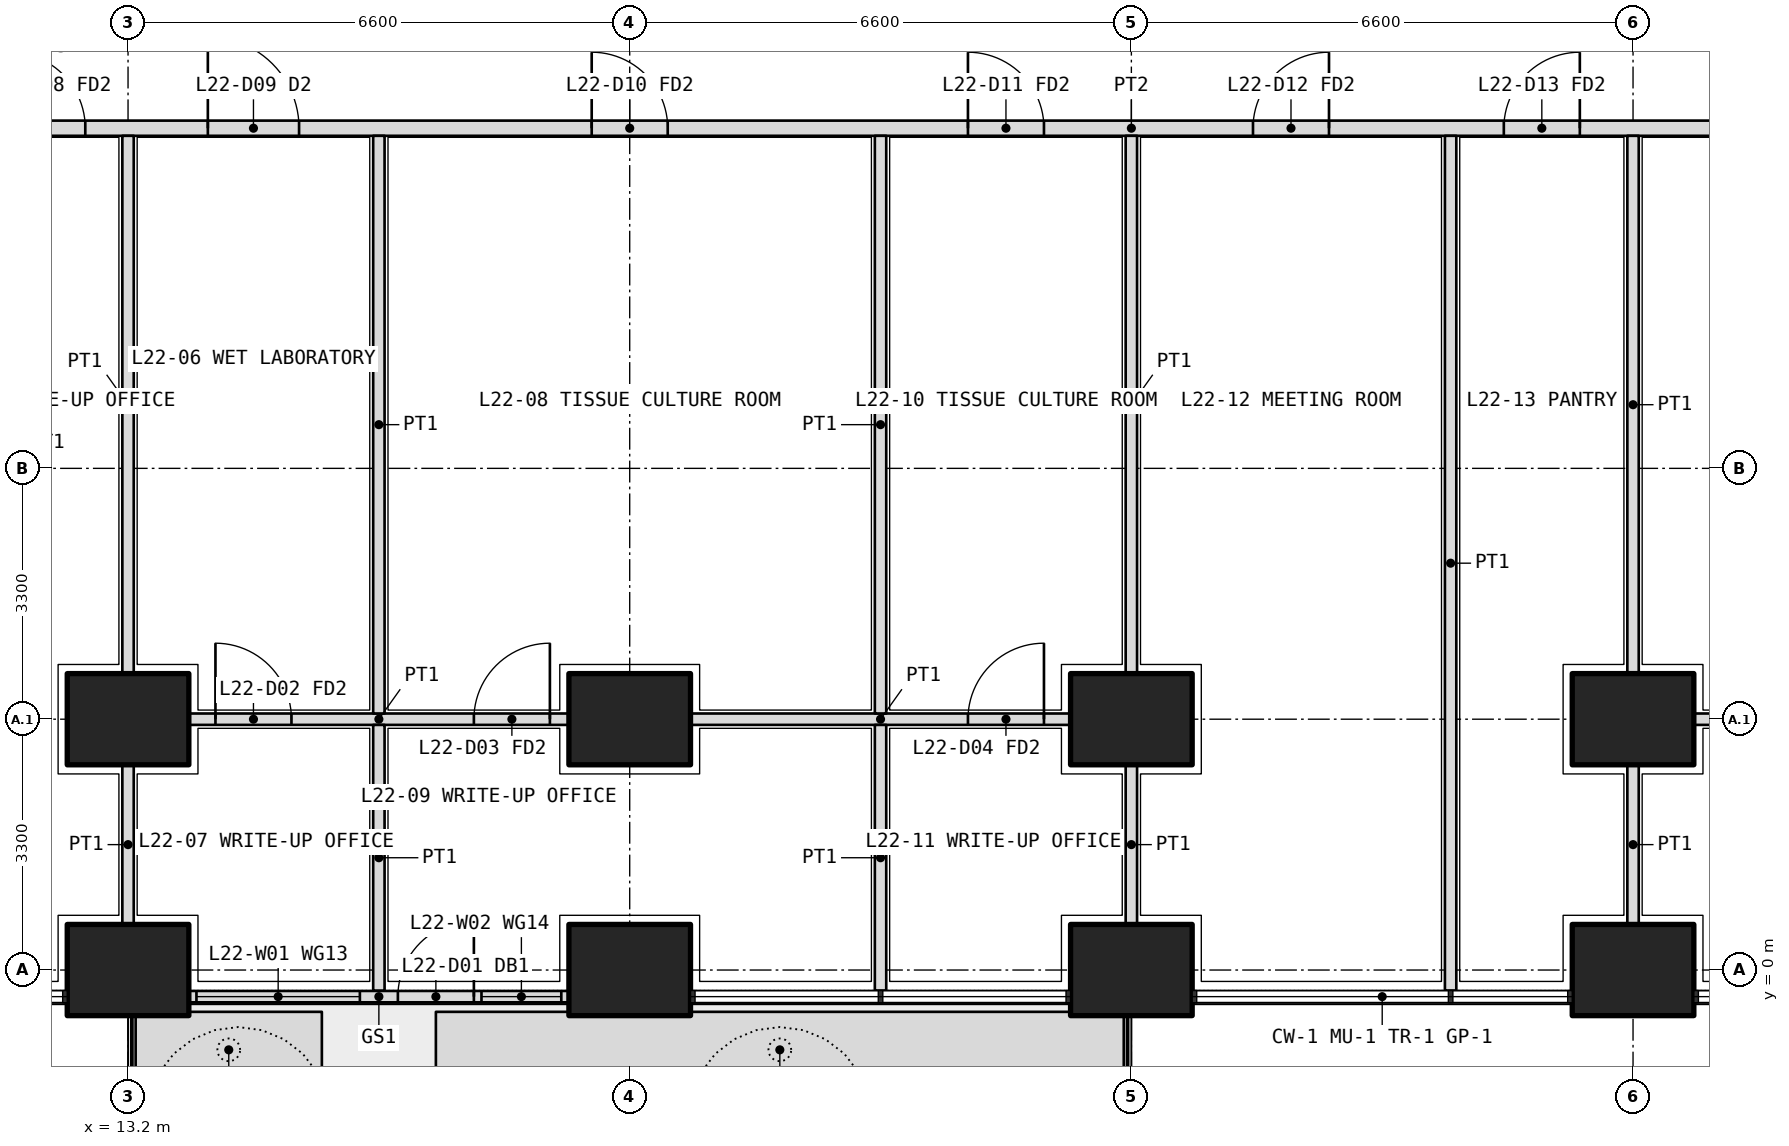
"""IFC4 building model, lengths in metres.
Left out: names, types, materials, properties, quantities, classifications, styles, units other than length and angle.
Written with IfcOpenShell. Run it as: python <this file> out.ifc"""

import sys

from ifc_helpers import new_model, si_unit, direction, frame, frame_2d, origin, origin_2d, place, context, subcontext, project, spatial, polyline, rectangle, outline, extrude, element, fill, save


model = new_model("IFC4")
c1 = context("Model", 3, precision=1e-05, world=origin(), true_north=direction((0.0, 1.0)))
c2 = subcontext(c1, "Body", "Model", "MODEL_VIEW")
j1 = project(units=[si_unit("LENGTHUNIT", "METRE"), si_unit("PLANEANGLEUNIT", "RADIAN")], contexts=[c1])
p1 = place(None, origin())
s1 = spatial("IfcSite", under=j1, at=p1, CompositionType="ELEMENT")
p2 = place(p1, origin())
s2 = spatial("IfcBuilding", under=s1, at=p2, CompositionType="ELEMENT")
p3 = place(p2, frame((0.0, 0.0, 99.0)))
s3 = spatial("IfcBuildingStorey", under=s2, at=p3, CompositionType="ELEMENT", Elevation=99.0)
for number, where, z_axis, x_axis in (
    (1, (13.2, 0.0, 0.0), (0.0, 0.0, 1.0), (1.0, 0.0, 0.0)),
    (2, (19.8, 0.0, 0.0), (0.0, 0.0, 1.0), (1.0, 0.0, 0.0)),
    (3, (26.4, 0.0, 0.0), (0.0, 0.0, 1.0), (1.0, 0.0, 0.0)),
    (4, (33.0, 0.0, 0.0), (0.0, 0.0, 1.0), (1.0, 0.0, 0.0)),
    (5, (13.2, 3.3, 0.0), (0.0, 0.0, 1.0), (1.0, 0.0, 0.0)),
    (6, (19.8, 3.3, 0.0), (0.0, 0.0, 1.0), (1.0, 0.0, 0.0)),
    (7, (26.4, 3.3, 0.0), (0.0, 0.0, 1.0), (1.0, 0.0, 0.0)),
    (8, (33.0, 3.3, 0.0), (0.0, 0.0, 1.0), (1.0, 0.0, 0.0)),
):
    element("IfcColumn", number, at=place(p3, frame(where, z_axis=z_axis, x_axis=x_axis)), inside=s3, PredefinedType="COLUMN", context=c2, shape_type="SweptSolid", body=[
        extrude(rectangle(XDim=1.6, YDim=1.2, at=origin_2d()), origin(), (0.0, 0.0, 1.0), 4.2),
    ])
p4 = place(p3, origin())
e9 = element("IfcWall", 9, at=p4, inside=s3, PredefinedType="USERDEFINED", context=c2, shape_type="SweptSolid", body=[
    extrude(outline(polyline([(13.3, -1.55), (15.75, -1.55), (15.75, -0.55), (13.3, -0.55), (13.3, -1.55)]), holes=[polyline([(13.45, -1.4), (15.6, -1.4), (15.6, -0.7), (13.45, -0.7), (13.45, -1.4)])]), origin(), (0.0, 0.0, 1.0), 1.05),
])
p5 = place(p3, origin())
e10 = element("IfcWall", 10, at=p5, inside=s3, PredefinedType="USERDEFINED", context=c2, shape_type="SweptSolid", body=[
    extrude(outline(polyline([(17.25, -1.55), (26.3, -1.55), (26.3, -0.55), (17.25, -0.55), (17.25, -1.55)]), holes=[polyline([(17.4, -1.4), (26.15, -1.4), (26.15, -0.7), (17.4, -0.7), (17.4, -1.4)])]), origin(), (0.0, 0.0, 1.0), 1.05),
])
p6 = place(p3, frame((14.0, -0.35, 0.0), z_axis=(0.0, 0.0, 1.0), x_axis=(1.0, 0.0, 0.0)))
e11 = element("IfcWall", 11, at=p6, inside=s3, PredefinedType="SOLIDWALL", context=c2, shape_type="SweptSolid", body=[
    extrude(rectangle(XDim=5.0, YDim=0.15, at=frame_2d((2.5, 0.0))), origin(), (0.0, 0.0, 1.0), 2.7),
])
p7 = place(p6, frame((2.75, 0.0, 0.0)))
e12 = element("IfcOpeningElement", 12, at=p7, cuts=e11, PredefinedType="OPENING", context=c2, shape_type="SweptSolid", body=[
    extrude(rectangle(XDim=1.0, YDim=2.4, at=frame_2d((0.5, 1.2))), frame((0.0, 0.085, 0.0), z_axis=(0.0, -1.0, 0.0), x_axis=(1.0, 0.0, 0.0)), (0.0, 0.0, 1.0), 0.17),
])
p8 = place(p6, frame((0.1, 0.0, 0.1)))
e13 = element("IfcOpeningElement", 13, at=p8, cuts=e11, PredefinedType="OPENING", context=c2, shape_type="SweptSolid", body=[
    extrude(rectangle(XDim=2.15, YDim=2.3, at=frame_2d((1.075, 1.15))), frame((0.0, 0.085, 0.0), z_axis=(0.0, -1.0, 0.0), x_axis=(1.0, 0.0, 0.0)), (0.0, 0.0, 1.0), 0.17),
])
p9 = place(p6, frame((3.85, 0.0, 0.1)))
e14 = element("IfcOpeningElement", 14, at=p9, cuts=e11, PredefinedType="OPENING", context=c2, shape_type="SweptSolid", body=[
    extrude(rectangle(XDim=1.05, YDim=2.3, at=frame_2d((0.525, 1.15))), frame((0.0, 0.085, 0.0), z_axis=(0.0, -1.0, 0.0), x_axis=(1.0, 0.0, 0.0)), (0.0, 0.0, 1.0), 0.17),
])
p10 = place(p3, frame((10.975, 11.075, 0.0), z_axis=(0.0, 0.0, 1.0), x_axis=(1.0, 0.0, 0.0)))
e15 = element("IfcWall", 15, at=p10, inside=s3, PredefinedType="PARTITIONING", context=c2, shape_type="SweptSolid", body=[
    extrude(rectangle(XDim=30.85, YDim=0.2, at=frame_2d((15.425, 0.0))), origin(), (0.0, 0.0, 1.0), 2.85),
])
p11 = place(p10, frame((0.663, 0.0, 0.0)))
e16 = element("IfcOpeningElement", 16, at=p11, cuts=e15, PredefinedType="OPENING", context=c2, shape_type="SweptSolid", body=[
    extrude(rectangle(XDim=1.0, YDim=2.1, at=frame_2d((0.5, 1.05))), frame((0.0, 0.11, 0.0), z_axis=(0.0, -1.0, 0.0), x_axis=(1.0, 0.0, 0.0)), (0.0, 0.0, 1.0), 0.22),
])
p12 = place(p10, frame((3.275, 0.0, 0.0)))
e17 = element("IfcOpeningElement", 17, at=p12, cuts=e15, PredefinedType="OPENING", context=c2, shape_type="SweptSolid", body=[
    extrude(rectangle(XDim=1.2, YDim=2.1, at=frame_2d((0.6, 1.05))), frame((0.0, 0.11, 0.0), z_axis=(0.0, -1.0, 0.0), x_axis=(1.0, 0.0, 0.0)), (0.0, 0.0, 1.0), 0.22),
])
p13 = place(p10, frame((8.325, 0.0, 0.0)))
e18 = element("IfcOpeningElement", 18, at=p13, cuts=e15, PredefinedType="OPENING", context=c2, shape_type="SweptSolid", body=[
    extrude(rectangle(XDim=1.0, YDim=2.1, at=frame_2d((0.5, 1.05))), frame((0.0, 0.11, 0.0), z_axis=(0.0, -1.0, 0.0), x_axis=(1.0, 0.0, 0.0)), (0.0, 0.0, 1.0), 0.22),
])
p14 = place(p10, frame((13.275, 0.0, 0.0)))
e19 = element("IfcOpeningElement", 19, at=p14, cuts=e15, PredefinedType="OPENING", context=c2, shape_type="SweptSolid", body=[
    extrude(rectangle(XDim=1.0, YDim=2.1, at=frame_2d((0.5, 1.05))), frame((0.0, 0.11, 0.0), z_axis=(0.0, -1.0, 0.0), x_axis=(1.0, 0.0, 0.0)), (0.0, 0.0, 1.0), 0.22),
])
p15 = place(p10, frame((17.025, 0.0, 0.0)))
e20 = element("IfcOpeningElement", 20, at=p15, cuts=e15, PredefinedType="OPENING", context=c2, shape_type="SweptSolid", body=[
    extrude(rectangle(XDim=1.0, YDim=2.1, at=frame_2d((0.5, 1.05))), frame((0.0, 0.11, 0.0), z_axis=(0.0, -1.0, 0.0), x_axis=(1.0, 0.0, 0.0)), (0.0, 0.0, 1.0), 0.22),
])
p16 = place(p10, frame((20.325, 0.0, 0.0)))
e21 = element("IfcOpeningElement", 21, at=p16, cuts=e15, PredefinedType="OPENING", context=c2, shape_type="SweptSolid", body=[
    extrude(rectangle(XDim=1.0, YDim=2.1, at=frame_2d((0.5, 1.05))), frame((0.0, 0.11, 0.0), z_axis=(0.0, -1.0, 0.0), x_axis=(1.0, 0.0, 0.0)), (0.0, 0.0, 1.0), 0.22),
])
p17 = place(p10, frame((25.887, 0.0, 0.0)))
e22 = element("IfcOpeningElement", 22, at=p17, cuts=e15, PredefinedType="OPENING", context=c2, shape_type="SweptSolid", body=[
    extrude(rectangle(XDim=1.0, YDim=2.1, at=frame_2d((0.5, 1.05))), frame((0.0, 0.11, 0.0), z_axis=(0.0, -1.0, 0.0), x_axis=(1.0, 0.0, 0.0)), (0.0, 0.0, 1.0), 0.22),
])
p18 = place(p3, frame((14.0, 3.3, 0.0), z_axis=(0.0, 0.0, 1.0), x_axis=(1.0, 0.0, 0.0)))
e23 = element("IfcWall", 23, at=p18, inside=s3, PredefinedType="PARTITIONING", context=c2, shape_type="SweptSolid", body=[
    extrude(rectangle(XDim=5.0, YDim=0.15, at=frame_2d((2.5, 0.0))), origin(), (0.0, 0.0, 1.0), 3.9),
])
p19 = place(p18, frame((0.35, 0.0, 0.0)))
e24 = element("IfcOpeningElement", 24, at=p19, cuts=e23, PredefinedType="OPENING", context=c2, shape_type="SweptSolid", body=[
    extrude(rectangle(XDim=1.0, YDim=2.1, at=frame_2d((0.5, 1.05))), frame((0.0, 0.085, 0.0), z_axis=(0.0, -1.0, 0.0), x_axis=(1.0, 0.0, 0.0)), (0.0, 0.0, 1.0), 0.17),
])
p20 = place(p18, frame((3.75, 0.0, 0.0)))
e25 = element("IfcOpeningElement", 25, at=p20, cuts=e23, PredefinedType="OPENING", context=c2, shape_type="SweptSolid", body=[
    extrude(rectangle(XDim=1.0, YDim=2.1, at=frame_2d((0.5, 1.05))), frame((0.0, 0.085, 0.0), z_axis=(0.0, -1.0, 0.0), x_axis=(1.0, 0.0, 0.0)), (0.0, 0.0, 1.0), 0.17),
])
p21 = place(p3, frame((20.6, 3.3, 0.0), z_axis=(0.0, 0.0, 1.0), x_axis=(1.0, 0.0, 0.0)))
e26 = element("IfcWall", 26, at=p21, inside=s3, PredefinedType="PARTITIONING", context=c2, shape_type="SweptSolid", body=[
    extrude(rectangle(XDim=5.0, YDim=0.15, at=frame_2d((2.5, 0.0))), origin(), (0.0, 0.0, 1.0), 3.9),
])
p22 = place(p21, frame((3.65, 0.0, 0.0)))
e27 = element("IfcOpeningElement", 27, at=p22, cuts=e26, PredefinedType="OPENING", context=c2, shape_type="SweptSolid", body=[
    extrude(rectangle(XDim=1.0, YDim=2.1, at=frame_2d((0.5, 1.05))), frame((0.0, 0.085, 0.0), z_axis=(0.0, -1.0, 0.0), x_axis=(1.0, 0.0, 0.0)), (0.0, 0.0, 1.0), 0.17),
])
p23 = place(p3, frame((33.8, 3.3, 0.0), z_axis=(0.0, 0.0, 1.0), x_axis=(1.0, 0.0, 0.0)))
e28 = element("IfcWall", 28, at=p23, inside=s3, PredefinedType="PARTITIONING", context=c2, shape_type="SweptSolid", body=[
    extrude(rectangle(XDim=5.0, YDim=0.15, at=frame_2d((2.5, 0.0))), origin(), (0.0, 0.0, 1.0), 3.9),
])
p24 = place(p3, frame((30.6, -0.27, 0.0), z_axis=(0.0, 0.0, 1.0), x_axis=(0.0, 1.0, 0.0)))
e29 = element("IfcWall", 29, at=p24, inside=s3, PredefinedType="PARTITIONING", context=c2, shape_type="SweptSolid", body=[
    extrude(rectangle(XDim=11.245, YDim=0.15, at=frame_2d((5.623, 0.0))), origin(), (0.0, 0.0, 1.0), 2.7),
])
p25 = place(p3, frame((33.0, 0.6, 0.0), z_axis=(0.0, 0.0, 1.0), x_axis=(0.0, 1.0, 0.0)))
e30 = element("IfcWall", 30, at=p25, inside=s3, PredefinedType="PARTITIONING", context=c2, shape_type="SweptSolid", body=[
    extrude(rectangle(XDim=2.1, YDim=0.15, at=frame_2d((1.05, 0.0))), origin(), (0.0, 0.0, 1.0), 2.85),
])
p26 = place(p3, frame((33.0, 3.9, 0.0), z_axis=(0.0, 0.0, 1.0), x_axis=(0.0, 1.0, 0.0)))
e31 = element("IfcWall", 31, at=p26, inside=s3, PredefinedType="PARTITIONING", context=c2, shape_type="SweptSolid", body=[
    extrude(rectangle(XDim=7.075, YDim=0.15, at=frame_2d((3.538, 0.0))), origin(), (0.0, 0.0, 1.0), 2.85),
])
p27 = place(p3, frame((13.2, 0.6, 0.0), z_axis=(0.0, 0.0, 1.0), x_axis=(0.0, 1.0, 0.0)))
e32 = element("IfcWall", 32, at=p27, inside=s3, PredefinedType="PARTITIONING", context=c2, shape_type="SweptSolid", body=[
    extrude(rectangle(XDim=2.1, YDim=0.15, at=frame_2d((1.05, 0.0))), origin(), (0.0, 0.0, 1.0), 2.85),
])
p28 = place(p3, frame((13.2, 3.9, 0.0), z_axis=(0.0, 0.0, 1.0), x_axis=(0.0, 1.0, 0.0)))
e33 = element("IfcWall", 33, at=p28, inside=s3, PredefinedType="PARTITIONING", context=c2, shape_type="SweptSolid", body=[
    extrude(rectangle(XDim=7.075, YDim=0.15, at=frame_2d((3.538, 0.0))), origin(), (0.0, 0.0, 1.0), 2.85),
])
p29 = place(p3, frame((16.5, -0.27, 0.0), z_axis=(0.0, 0.0, 1.0), x_axis=(0.0, 1.0, 0.0)))
e34 = element("IfcWall", 34, at=p29, inside=s3, PredefinedType="PARTITIONING", context=c2, shape_type="SweptSolid", body=[
    extrude(rectangle(XDim=3.495, YDim=0.15, at=frame_2d((1.748, 0.0))), origin(), (0.0, 0.0, 1.0), 2.7),
])
p30 = place(p3, frame((16.5, 3.375, 0.0), z_axis=(0.0, 0.0, 1.0), x_axis=(0.0, 1.0, 0.0)))
e35 = element("IfcWall", 35, at=p30, inside=s3, PredefinedType="PARTITIONING", context=c2, shape_type="SweptSolid", body=[
    extrude(rectangle(XDim=7.6, YDim=0.15, at=frame_2d((3.8, 0.0))), origin(), (0.0, 0.0, 1.0), 3.9),
])
p31 = place(p3, frame((23.1, -0.27, 0.0), z_axis=(0.0, 0.0, 1.0), x_axis=(0.0, 1.0, 0.0)))
e36 = element("IfcWall", 36, at=p31, inside=s3, PredefinedType="PARTITIONING", context=c2, shape_type="SweptSolid", body=[
    extrude(rectangle(XDim=3.495, YDim=0.15, at=frame_2d((1.748, 0.0))), origin(), (0.0, 0.0, 1.0), 2.7),
])
p32 = place(p3, frame((23.1, 3.375, 0.0), z_axis=(0.0, 0.0, 1.0), x_axis=(0.0, 1.0, 0.0)))
e37 = element("IfcWall", 37, at=p32, inside=s3, PredefinedType="PARTITIONING", context=c2, shape_type="SweptSolid", body=[
    extrude(rectangle(XDim=7.6, YDim=0.15, at=frame_2d((3.8, 0.0))), origin(), (0.0, 0.0, 1.0), 3.9),
])
p33 = place(p3, frame((26.4, 0.6, 0.0), z_axis=(0.0, 0.0, 1.0), x_axis=(0.0, 1.0, 0.0)))
e38 = element("IfcWall", 38, at=p33, inside=s3, PredefinedType="PARTITIONING", context=c2, shape_type="SweptSolid", body=[
    extrude(rectangle(XDim=2.1, YDim=0.15, at=frame_2d((1.05, 0.0))), origin(), (0.0, 0.0, 1.0), 2.85),
])
p34 = place(p3, frame((26.4, 3.9, 0.0), z_axis=(0.0, 0.0, 1.0), x_axis=(0.0, 1.0, 0.0)))
e39 = element("IfcWall", 39, at=p34, inside=s3, PredefinedType="PARTITIONING", context=c2, shape_type="SweptSolid", body=[
    extrude(rectangle(XDim=7.075, YDim=0.15, at=frame_2d((3.538, 0.0))), origin(), (0.0, 0.0, 1.0), 2.85),
])
p35 = place(p7, origin())
e40 = element("IfcDoor", 40, at=p35, inside=s3, OperationType="SINGLE_SWING_RIGHT", PredefinedType="DOOR", context=c2, shape_type="SweptSolid", body=[
    extrude(rectangle(XDim=1.0, YDim=2.4, at=frame_2d((0.5, 1.2))), frame((0.0, 0.025, 0.0), z_axis=(0.0, -1.0, 0.0), x_axis=(1.0, 0.0, 0.0)), (0.0, 0.0, 1.0), 0.05),
])
fill(e12, e40)
p36 = place(p8, origin())
e41 = element("IfcWindow", 41, at=p36, inside=s3, PartitioningType="SINGLE_PANEL", PredefinedType="WINDOW", context=c2, shape_type="SweptSolid", body=[
    extrude(rectangle(XDim=2.15, YDim=2.3, at=frame_2d((1.075, 1.15))), frame((0.0, 0.03, 0.0), z_axis=(0.0, -1.0, 0.0), x_axis=(1.0, 0.0, 0.0)), (0.0, 0.0, 1.0), 0.06),
])
fill(e13, e41)
p37 = place(p9, origin())
e42 = element("IfcWindow", 42, at=p37, inside=s3, PartitioningType="SINGLE_PANEL", PredefinedType="WINDOW", context=c2, shape_type="SweptSolid", body=[
    extrude(rectangle(XDim=1.05, YDim=2.3, at=frame_2d((0.525, 1.15))), frame((0.0, 0.03, 0.0), z_axis=(0.0, -1.0, 0.0), x_axis=(1.0, 0.0, 0.0)), (0.0, 0.0, 1.0), 0.06),
])
fill(e14, e42)
p38 = place(p11, origin())
e43 = element("IfcDoor", 43, at=p38, inside=s3, OperationType="SINGLE_SWING_LEFT", PredefinedType="DOOR", context=c2, shape_type="SweptSolid", body=[
    extrude(rectangle(XDim=1.0, YDim=2.1, at=frame_2d((0.5, 1.05))), frame((0.0, 0.025, 0.0), z_axis=(0.0, -1.0, 0.0), x_axis=(1.0, 0.0, 0.0)), (0.0, 0.0, 1.0), 0.05),
])
fill(e16, e43)
p39 = place(p12, origin())
e44 = element("IfcDoor", 44, at=p39, inside=s3, OperationType="DOUBLE_DOOR_SINGLE_SWING", PredefinedType="DOOR", context=c2, shape_type="SweptSolid", body=[
    extrude(rectangle(XDim=1.2, YDim=2.1, at=frame_2d((0.6, 1.05))), frame((0.0, 0.025, 0.0), z_axis=(0.0, -1.0, 0.0), x_axis=(1.0, 0.0, 0.0)), (0.0, 0.0, 1.0), 0.05),
])
fill(e17, e44)
p40 = place(p19, origin())
e45 = element("IfcDoor", 45, at=p40, inside=s3, OperationType="SINGLE_SWING_LEFT", PredefinedType="DOOR", context=c2, shape_type="SweptSolid", body=[
    extrude(rectangle(XDim=1.0, YDim=2.1, at=frame_2d((0.5, 1.05))), frame((0.0, 0.025, 0.0), z_axis=(0.0, -1.0, 0.0), x_axis=(1.0, 0.0, 0.0)), (0.0, 0.0, 1.0), 0.05),
])
fill(e24, e45)
p41 = place(p13, origin())
e46 = element("IfcDoor", 46, at=p41, inside=s3, OperationType="SINGLE_SWING_LEFT", PredefinedType="DOOR", context=c2, shape_type="SweptSolid", body=[
    extrude(rectangle(XDim=1.0, YDim=2.1, at=frame_2d((0.5, 1.05))), frame((0.0, 0.025, 0.0), z_axis=(0.0, -1.0, 0.0), x_axis=(1.0, 0.0, 0.0)), (0.0, 0.0, 1.0), 0.05),
])
fill(e18, e46)
p42 = place(p20, origin())
e47 = element("IfcDoor", 47, at=p42, inside=s3, OperationType="SINGLE_SWING_RIGHT", PredefinedType="DOOR", context=c2, shape_type="SweptSolid", body=[
    extrude(rectangle(XDim=1.0, YDim=2.1, at=frame_2d((0.5, 1.05))), frame((0.0, 0.025, 0.0), z_axis=(0.0, -1.0, 0.0), x_axis=(1.0, 0.0, 0.0)), (0.0, 0.0, 1.0), 0.05),
])
fill(e25, e47)
p43 = place(p14, origin())
e48 = element("IfcDoor", 48, at=p43, inside=s3, OperationType="SINGLE_SWING_LEFT", PredefinedType="DOOR", context=c2, shape_type="SweptSolid", body=[
    extrude(rectangle(XDim=1.0, YDim=2.1, at=frame_2d((0.5, 1.05))), frame((0.0, 0.025, 0.0), z_axis=(0.0, -1.0, 0.0), x_axis=(1.0, 0.0, 0.0)), (0.0, 0.0, 1.0), 0.05),
])
fill(e19, e48)
p44 = place(p22, origin())
e49 = element("IfcDoor", 49, at=p44, inside=s3, OperationType="SINGLE_SWING_RIGHT", PredefinedType="DOOR", context=c2, shape_type="SweptSolid", body=[
    extrude(rectangle(XDim=1.0, YDim=2.1, at=frame_2d((0.5, 1.05))), frame((0.0, 0.025, 0.0), z_axis=(0.0, -1.0, 0.0), x_axis=(1.0, 0.0, 0.0)), (0.0, 0.0, 1.0), 0.05),
])
fill(e27, e49)
p45 = place(p15, origin())
e50 = element("IfcDoor", 50, at=p45, inside=s3, OperationType="SINGLE_SWING_RIGHT", PredefinedType="DOOR", context=c2, shape_type="SweptSolid", body=[
    extrude(rectangle(XDim=1.0, YDim=2.1, at=frame_2d((0.5, 1.05))), frame((0.0, 0.025, 0.0), z_axis=(0.0, -1.0, 0.0), x_axis=(1.0, 0.0, 0.0)), (0.0, 0.0, 1.0), 0.05),
])
fill(e20, e50)
p46 = place(p16, origin())
e51 = element("IfcDoor", 51, at=p46, inside=s3, OperationType="SINGLE_SWING_RIGHT", PredefinedType="DOOR", context=c2, shape_type="SweptSolid", body=[
    extrude(rectangle(XDim=1.0, YDim=2.1, at=frame_2d((0.5, 1.05))), frame((0.0, 0.025, 0.0), z_axis=(0.0, -1.0, 0.0), x_axis=(1.0, 0.0, 0.0)), (0.0, 0.0, 1.0), 0.05),
])
fill(e21, e51)
save(model, sys.argv[1])
